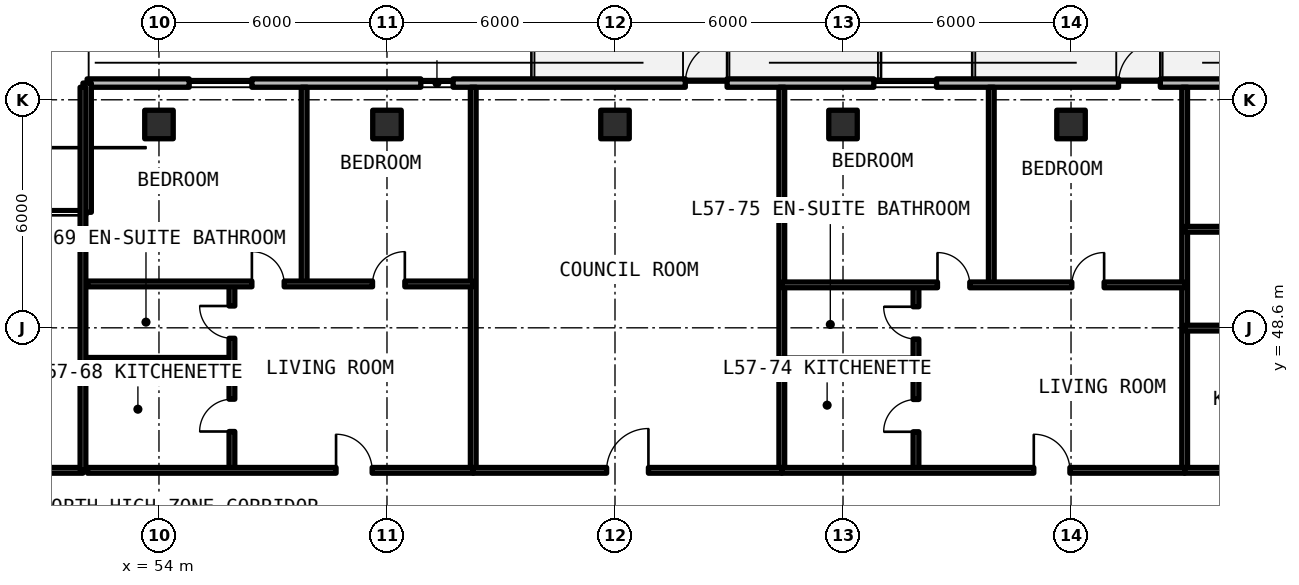
"""IFC4 building model, lengths in metres.
Left out: names, types, materials, properties, quantities, classifications, styles, units other than length and angle.
Written with IfcOpenShell. Run it as: python <this file> out.ifc"""

import sys

from ifc_helpers import new_model, si_unit, direction, frame, frame_2d, origin, origin_2d, place, context, subcontext, project, spatial, rectangle, extrude, element, fill, save


model = new_model("IFC4")
c1 = context("Model", 3, precision=1e-05, world=origin(), true_north=direction((0.0, 1.0)))
c2 = subcontext(c1, "Body", "Model", "MODEL_VIEW")
j1 = project(units=[si_unit("LENGTHUNIT", "METRE"), si_unit("PLANEANGLEUNIT", "RADIAN")], contexts=[c1])
p1 = place(None, origin())
s1 = spatial("IfcSite", under=j1, at=p1, CompositionType="ELEMENT")
p2 = place(p1, origin())
s2 = spatial("IfcBuilding", under=s1, at=p2, CompositionType="ELEMENT")
p3 = place(p2, frame((0.0, 0.0, 204.93)))
s3 = spatial("IfcBuildingStorey", under=s2, at=p3, CompositionType="ELEMENT", Elevation=204.93)
for number, where, z_axis, x_axis in (
    (1, (54.0, 53.95, 0.0), (0.0, 0.0, 1.0), (1.0, 0.0, 0.0)),
    (2, (60.0, 53.95, 0.0), (0.0, 0.0, 1.0), (1.0, 0.0, 0.0)),
    (3, (66.0, 53.95, 0.0), (0.0, 0.0, 1.0), (1.0, 0.0, 0.0)),
    (4, (72.0, 53.95, 0.0), (0.0, 0.0, 1.0), (1.0, 0.0, 0.0)),
    (5, (78.0, 53.95, 0.0), (0.0, 0.0, 1.0), (1.0, 0.0, 0.0)),
):
    element("IfcColumn", number, at=place(p3, frame(where, z_axis=z_axis, x_axis=x_axis)), inside=s3, PredefinedType="COLUMN", context=c2, shape_type="SweptSolid", body=[
        extrude(rectangle(XDim=0.75, YDim=0.75, at=origin_2d()), origin(), (0.0, 0.0, 1.0), 3.3),
    ])
p4 = place(p3, frame((95.354, 55.04, 0.0), z_axis=(0.0, 0.0, 1.0), x_axis=(-1.0, 0.0, 0.0)))
e6 = element("IfcWall", 6, at=p4, inside=s3, PredefinedType="SOLIDWALL", context=c2, shape_type="SweptSolid", body=[
    extrude(rectangle(XDim=43.244, YDim=0.22, at=frame_2d((21.622, 0.0))), origin(), (0.0, 0.0, 1.0), 3.08),
])
p5 = place(p4, frame((26.404, 0.0, 0.0)))
e7 = element("IfcOpeningElement", 7, at=p5, cuts=e6, PredefinedType="OPENING", context=c2, shape_type="SweptSolid", body=[
    extrude(rectangle(XDim=1.1, YDim=2.15, at=frame_2d((0.55, 1.075))), frame((0.0, 0.12, 0.0), z_axis=(0.0, -1.0, 0.0), x_axis=(1.0, 0.0, 0.0)), (0.0, 0.0, 1.0), 0.24),
])
p6 = place(p4, frame((15.004, 0.0, 0.0)))
e8 = element("IfcOpeningElement", 8, at=p6, cuts=e6, PredefinedType="OPENING", context=c2, shape_type="SweptSolid", body=[
    extrude(rectangle(XDim=1.1, YDim=2.15, at=frame_2d((0.55, 1.075))), frame((0.0, 0.12, 0.0), z_axis=(0.0, -1.0, 0.0), x_axis=(1.0, 0.0, 0.0)), (0.0, 0.0, 1.0), 0.24),
])
p7 = place(p4, frame((38.909, 0.0, 0.78)))
e9 = element("IfcOpeningElement", 9, at=p7, cuts=e6, PredefinedType="OPENING", context=c2, shape_type="SweptSolid", body=[
    extrude(rectangle(XDim=1.65, YDim=1.66, at=frame_2d((0.825, 0.83))), frame((0.0, 0.12, 0.0), z_axis=(0.0, -1.0, 0.0), x_axis=(1.0, 0.0, 0.0)), (0.0, 0.0, 1.0), 0.24),
])
p8 = place(p4, frame((33.615, 0.0, 0.78)))
e10 = element("IfcOpeningElement", 10, at=p8, cuts=e6, PredefinedType="OPENING", context=c2, shape_type="SweptSolid", body=[
    extrude(rectangle(XDim=0.85, YDim=1.65, at=frame_2d((0.425, 0.825))), frame((0.0, 0.12, 0.0), z_axis=(0.0, -1.0, 0.0), x_axis=(1.0, 0.0, 0.0)), (0.0, 0.0, 1.0), 0.24),
])
p9 = place(p4, frame((20.894, 0.0, 0.78)))
e11 = element("IfcOpeningElement", 11, at=p9, cuts=e6, PredefinedType="OPENING", context=c2, shape_type="SweptSolid", body=[
    extrude(rectangle(XDim=1.65, YDim=1.66, at=frame_2d((0.825, 0.83))), frame((0.0, 0.12, 0.0), z_axis=(0.0, -1.0, 0.0), x_axis=(1.0, 0.0, 0.0)), (0.0, 0.0, 1.0), 0.24),
])
p10 = place(p4, frame((8.792, 0.0, 0.78)))
e12 = element("IfcOpeningElement", 12, at=p10, cuts=e6, PredefinedType="OPENING", context=c2, shape_type="SweptSolid", body=[
    extrude(rectangle(XDim=1.65, YDim=1.66, at=frame_2d((0.825, 0.83))), frame((0.0, 0.12, 0.0), z_axis=(0.0, -1.0, 0.0), x_axis=(1.0, 0.0, 0.0)), (0.0, 0.0, 1.0), 0.24),
])
p11 = place(p4, frame((2.487, 0.0, 0.78)))
e13 = element("IfcOpeningElement", 13, at=p11, cuts=e6, PredefinedType="OPENING", context=c2, shape_type="SweptSolid", body=[
    extrude(rectangle(XDim=1.65, YDim=1.66, at=frame_2d((0.825, 0.83))), frame((0.0, 0.12, 0.0), z_axis=(0.0, -1.0, 0.0), x_axis=(1.0, 0.0, 0.0)), (0.0, 0.0, 1.0), 0.24),
])
p12 = place(p3, frame((52.11, 55.04, 0.0), z_axis=(0.0, 0.0, 1.0), x_axis=(0.0, -1.0, 0.0)))
e14 = element("IfcWall", 14, at=p12, inside=s3, PredefinedType="SOLIDWALL", context=c2, shape_type="SweptSolid", body=[
    extrude(rectangle(XDim=3.4, YDim=0.22, at=frame_2d((1.7, 0.0))), origin(), (0.0, 0.0, 1.0), 3.08),
])
p13 = place(p3, frame((43.6, 44.85, 0.0), z_axis=(0.0, 0.0, 1.0), x_axis=(1.0, 0.0, 0.0)))
e15 = element("IfcWall", 15, at=p13, inside=s3, PredefinedType="SOLIDWALL", context=c2, shape_type="SweptSolid", body=[
    extrude(rectangle(XDim=8.4, YDim=0.15, at=frame_2d((4.2, 0.0))), origin(), (0.0, 0.0, 1.0), 2.35),
])
p14 = place(p13, frame((3.65, 0.0, 0.0)))
e16 = element("IfcOpeningElement", 16, at=p14, cuts=e15, PredefinedType="OPENING", context=c2, shape_type="SweptSolid", body=[
    extrude(rectangle(XDim=1.1, YDim=2.15, at=frame_2d((0.55, 1.075))), frame((0.0, 0.085, 0.0), z_axis=(0.0, -1.0, 0.0), x_axis=(1.0, 0.0, 0.0)), (0.0, 0.0, 1.0), 0.17),
])
for number, where, z_axis, x_axis in (
    (17, (52.0, 44.85, 0.0), (0.0, 0.0, 1.0), (0.0, 1.0, 0.0)),
    (18, (62.27, 44.85, 0.0), (0.0, 0.0, 1.0), (0.0, 1.0, 0.0)),
):
    element("IfcWall", number, at=place(p3, frame(where, z_axis=z_axis, x_axis=x_axis)), inside=s3, PredefinedType="SOLIDWALL", context=c2, shape_type="SweptSolid", body=[
        extrude(rectangle(XDim=10.08, YDim=0.15, at=frame_2d((5.04, 0.0))), origin(), (0.0, 0.0, 1.0), 2.35),
    ])
p15 = place(p3, frame((52.12, 47.744, 0.0), z_axis=(0.0, 0.0, 1.0), x_axis=(1.0, 0.0, 0.0)))
e19 = element("IfcWall", 19, at=p15, inside=s3, PredefinedType="PARTITIONING", context=c2, shape_type="SweptSolid", body=[
    extrude(rectangle(XDim=3.8, YDim=0.15, at=frame_2d((1.9, 0.0))), origin(), (0.0, 0.0, 1.0), 2.35),
])
p16 = place(p3, frame((55.92, 44.85, 0.0), z_axis=(0.0, 0.0, 1.0), x_axis=(0.0, 1.0, 0.0)))
e20 = element("IfcWall", 20, at=p16, inside=s3, PredefinedType="PARTITIONING", context=c2, shape_type="SweptSolid", body=[
    extrude(rectangle(XDim=4.905, YDim=0.15, at=frame_2d((2.452, 0.0))), origin(), (0.0, 0.0, 1.0), 2.35),
])
p17 = place(p16, frame((1.022, 0.0, 0.0)))
e21 = element("IfcOpeningElement", 21, at=p17, cuts=e20, PredefinedType="OPENING", context=c2, shape_type="SweptSolid", body=[
    extrude(rectangle(XDim=0.85, YDim=2.1, at=frame_2d((0.425, 1.05))), frame((0.0, 0.085, 0.0), z_axis=(0.0, -1.0, 0.0), x_axis=(1.0, 0.0, 0.0)), (0.0, 0.0, 1.0), 0.17),
])
p18 = place(p16, frame((3.474, 0.0, 0.0)))
e22 = element("IfcOpeningElement", 22, at=p18, cuts=e20, PredefinedType="OPENING", context=c2, shape_type="SweptSolid", body=[
    extrude(rectangle(XDim=0.85, YDim=2.1, at=frame_2d((0.425, 1.05))), frame((0.0, 0.085, 0.0), z_axis=(0.0, -1.0, 0.0), x_axis=(1.0, 0.0, 0.0)), (0.0, 0.0, 1.0), 0.17),
])
p19 = place(p3, frame((57.82, 49.755, 0.0), z_axis=(0.0, 0.0, 1.0), x_axis=(0.0, 1.0, 0.0)))
e23 = element("IfcWall", 23, at=p19, inside=s3, PredefinedType="PARTITIONING", context=c2, shape_type="SweptSolid", body=[
    extrude(rectangle(XDim=5.175, YDim=0.15, at=frame_2d((2.588, 0.0))), origin(), (0.0, 0.0, 1.0), 2.35),
])
p20 = place(p3, frame((52.12, 49.755, 0.0), z_axis=(0.0, 0.0, 1.0), x_axis=(1.0, 0.0, 0.0)))
e24 = element("IfcWall", 24, at=p20, inside=s3, PredefinedType="PARTITIONING", context=c2, shape_type="SweptSolid", body=[
    extrude(rectangle(XDim=10.15, YDim=0.15, at=frame_2d((5.075, 0.0))), origin(), (0.0, 0.0, 1.0), 2.35),
])
p21 = place(p20, frame((4.325, 0.0, 0.0)))
e25 = element("IfcOpeningElement", 25, at=p21, cuts=e24, PredefinedType="OPENING", context=c2, shape_type="SweptSolid", body=[
    extrude(rectangle(XDim=0.85, YDim=2.1, at=frame_2d((0.425, 1.05))), frame((0.0, 0.085, 0.0), z_axis=(0.0, -1.0, 0.0), x_axis=(1.0, 0.0, 0.0)), (0.0, 0.0, 1.0), 0.17),
])
p22 = place(p20, frame((7.5, 0.0, 0.0)))
e26 = element("IfcOpeningElement", 26, at=p22, cuts=e24, PredefinedType="OPENING", context=c2, shape_type="SweptSolid", body=[
    extrude(rectangle(XDim=0.85, YDim=2.1, at=frame_2d((0.425, 1.05))), frame((0.0, 0.085, 0.0), z_axis=(0.0, -1.0, 0.0), x_axis=(1.0, 0.0, 0.0)), (0.0, 0.0, 1.0), 0.17),
])
p23 = place(p3, frame((52.12, 44.85, 0.0), z_axis=(0.0, 0.0, 1.0), x_axis=(1.0, 0.0, 0.0)))
e27 = element("IfcWall", 27, at=p23, inside=s3, PredefinedType="SOLIDWALL", context=c2, shape_type="SweptSolid", body=[
    extrude(rectangle(XDim=10.15, YDim=0.15, at=frame_2d((5.075, 0.0))), origin(), (0.0, 0.0, 1.0), 2.35),
])
p24 = place(p23, frame((6.54, 0.0, 0.0)))
e28 = element("IfcOpeningElement", 28, at=p24, cuts=e27, PredefinedType="OPENING", context=c2, shape_type="SweptSolid", body=[
    extrude(rectangle(XDim=0.95, YDim=2.15, at=frame_2d((0.475, 1.075))), frame((0.0, 0.085, 0.0), z_axis=(0.0, -1.0, 0.0), x_axis=(1.0, 0.0, 0.0)), (0.0, 0.0, 1.0), 0.17),
])
p25 = place(p3, frame((70.389, 44.85, 0.0), z_axis=(0.0, 0.0, 1.0), x_axis=(0.0, 1.0, 0.0)))
e29 = element("IfcWall", 29, at=p25, inside=s3, PredefinedType="SOLIDWALL", context=c2, shape_type="SweptSolid", body=[
    extrude(rectangle(XDim=10.08, YDim=0.15, at=frame_2d((5.04, 0.0))), origin(), (0.0, 0.0, 1.0), 2.35),
])
p26 = place(p3, frame((62.27, 44.85, 0.0), z_axis=(0.0, 0.0, 1.0), x_axis=(1.0, 0.0, 0.0)))
e30 = element("IfcWall", 30, at=p26, inside=s3, PredefinedType="SOLIDWALL", context=c2, shape_type="SweptSolid", body=[
    extrude(rectangle(XDim=8.12, YDim=0.15, at=frame_2d((4.06, 0.0))), origin(), (0.0, 0.0, 1.0), 2.35),
])
p27 = place(p26, frame((3.51, 0.0, 0.0)))
e31 = element("IfcOpeningElement", 31, at=p27, cuts=e30, PredefinedType="OPENING", context=c2, shape_type="SweptSolid", body=[
    extrude(rectangle(XDim=1.1, YDim=2.15, at=frame_2d((0.55, 1.075))), frame((0.0, 0.085, 0.0), z_axis=(0.0, -1.0, 0.0), x_axis=(1.0, 0.0, 0.0)), (0.0, 0.0, 1.0), 0.17),
])
p28 = place(p3, frame((80.99, 44.85, 0.0), z_axis=(0.0, 0.0, 1.0), x_axis=(0.0, 1.0, 0.0)))
e32 = element("IfcWall", 32, at=p28, inside=s3, PredefinedType="SOLIDWALL", context=c2, shape_type="SweptSolid", body=[
    extrude(rectangle(XDim=10.08, YDim=0.15, at=frame_2d((5.04, 0.0))), origin(), (0.0, 0.0, 1.0), 2.35),
])
p29 = place(p3, frame((70.389, 47.729, 0.0), z_axis=(0.0, 0.0, 1.0), x_axis=(1.0, 0.0, 0.0)))
e33 = element("IfcWall", 33, at=p29, inside=s3, PredefinedType="PARTITIONING", context=c2, shape_type="SweptSolid", body=[
    extrude(rectangle(XDim=3.531, YDim=0.15, at=frame_2d((1.765, 0.0))), origin(), (0.0, 0.0, 1.0), 2.35),
])
p30 = place(p3, frame((73.92, 44.85, 0.0), z_axis=(0.0, 0.0, 1.0), x_axis=(0.0, 1.0, 0.0)))
e34 = element("IfcWall", 34, at=p30, inside=s3, PredefinedType="PARTITIONING", context=c2, shape_type="SweptSolid", body=[
    extrude(rectangle(XDim=4.88, YDim=0.15, at=frame_2d((2.44, 0.0))), origin(), (0.0, 0.0, 1.0), 2.35),
])
p31 = place(p30, frame((1.015, 0.0, 0.0)))
e35 = element("IfcOpeningElement", 35, at=p31, cuts=e34, PredefinedType="OPENING", context=c2, shape_type="SweptSolid", body=[
    extrude(rectangle(XDim=0.85, YDim=2.1, at=frame_2d((0.425, 1.05))), frame((0.0, 0.085, 0.0), z_axis=(0.0, -1.0, 0.0), x_axis=(1.0, 0.0, 0.0)), (0.0, 0.0, 1.0), 0.17),
])
p32 = place(p30, frame((3.455, 0.0, 0.0)))
e36 = element("IfcOpeningElement", 36, at=p32, cuts=e34, PredefinedType="OPENING", context=c2, shape_type="SweptSolid", body=[
    extrude(rectangle(XDim=0.85, YDim=2.1, at=frame_2d((0.425, 1.05))), frame((0.0, 0.085, 0.0), z_axis=(0.0, -1.0, 0.0), x_axis=(1.0, 0.0, 0.0)), (0.0, 0.0, 1.0), 0.17),
])
p33 = place(p3, frame((75.902, 49.73, 0.0), z_axis=(0.0, 0.0, 1.0), x_axis=(0.0, 1.0, 0.0)))
e37 = element("IfcWall", 37, at=p33, inside=s3, PredefinedType="PARTITIONING", context=c2, shape_type="SweptSolid", body=[
    extrude(rectangle(XDim=5.2, YDim=0.15, at=frame_2d((2.6, 0.0))), origin(), (0.0, 0.0, 1.0), 2.35),
])
p34 = place(p3, frame((70.389, 49.73, 0.0), z_axis=(0.0, 0.0, 1.0), x_axis=(1.0, 0.0, 0.0)))
e38 = element("IfcWall", 38, at=p34, inside=s3, PredefinedType="PARTITIONING", context=c2, shape_type="SweptSolid", body=[
    extrude(rectangle(XDim=10.601, YDim=0.15, at=frame_2d((5.3, 0.0))), origin(), (0.0, 0.0, 1.0), 2.35),
])
p35 = place(p34, frame((4.096, 0.0, 0.0)))
e39 = element("IfcOpeningElement", 39, at=p35, cuts=e38, PredefinedType="OPENING", context=c2, shape_type="SweptSolid", body=[
    extrude(rectangle(XDim=0.85, YDim=2.1, at=frame_2d((0.425, 1.05))), frame((0.0, 0.085, 0.0), z_axis=(0.0, -1.0, 0.0), x_axis=(1.0, 0.0, 0.0)), (0.0, 0.0, 1.0), 0.17),
])
p36 = place(p34, frame((7.632, 0.0, 0.0)))
e40 = element("IfcOpeningElement", 40, at=p36, cuts=e38, PredefinedType="OPENING", context=c2, shape_type="SweptSolid", body=[
    extrude(rectangle(XDim=0.85, YDim=2.1, at=frame_2d((0.425, 1.05))), frame((0.0, 0.085, 0.0), z_axis=(0.0, -1.0, 0.0), x_axis=(1.0, 0.0, 0.0)), (0.0, 0.0, 1.0), 0.17),
])
p37 = place(p3, frame((70.389, 44.85, 0.0), z_axis=(0.0, 0.0, 1.0), x_axis=(1.0, 0.0, 0.0)))
e41 = element("IfcWall", 41, at=p37, inside=s3, PredefinedType="SOLIDWALL", context=c2, shape_type="SweptSolid", body=[
    extrude(rectangle(XDim=10.601, YDim=0.15, at=frame_2d((5.3, 0.0))), origin(), (0.0, 0.0, 1.0), 2.35),
])
p38 = place(p37, frame((6.631, 0.0, 0.0)))
e42 = element("IfcOpeningElement", 42, at=p38, cuts=e41, PredefinedType="OPENING", context=c2, shape_type="SweptSolid", body=[
    extrude(rectangle(XDim=0.95, YDim=2.15, at=frame_2d((0.475, 1.075))), frame((0.0, 0.085, 0.0), z_axis=(0.0, -1.0, 0.0), x_axis=(1.0, 0.0, 0.0)), (0.0, 0.0, 1.0), 0.17),
])
p39 = place(p3, frame((80.99, 48.592, 0.0), z_axis=(0.0, 0.0, 1.0), x_axis=(1.0, 0.0, 0.0)))
e43 = element("IfcWall", 43, at=p39, inside=s3, PredefinedType="PARTITIONING", context=c2, shape_type="SweptSolid", body=[
    extrude(rectangle(XDim=4.93, YDim=0.15, at=frame_2d((2.465, 0.0))), origin(), (0.0, 0.0, 1.0), 2.35),
])
p40 = place(p3, frame((80.99, 51.193, 0.0), z_axis=(0.0, 0.0, 1.0), x_axis=(1.0, 0.0, 0.0)))
e44 = element("IfcWall", 44, at=p40, inside=s3, PredefinedType="PARTITIONING", context=c2, shape_type="SweptSolid", body=[
    extrude(rectangle(XDim=7.894, YDim=0.15, at=frame_2d((3.947, 0.0))), origin(), (0.0, 0.0, 1.0), 2.35),
])
p41 = place(p40, frame((6.027, 0.0, 0.0)))
e45 = element("IfcOpeningElement", 45, at=p41, cuts=e44, PredefinedType="OPENING", context=c2, shape_type="SweptSolid", body=[
    extrude(rectangle(XDim=0.85, YDim=2.1, at=frame_2d((0.425, 1.05))), frame((0.0, 0.085, 0.0), z_axis=(0.0, -1.0, 0.0), x_axis=(1.0, 0.0, 0.0)), (0.0, 0.0, 1.0), 0.17),
])
p42 = place(p3, frame((80.99, 44.85, 0.0), z_axis=(0.0, 0.0, 1.0), x_axis=(1.0, 0.0, 0.0)))
e46 = element("IfcWall", 46, at=p42, inside=s3, PredefinedType="SOLIDWALL", context=c2, shape_type="SweptSolid", body=[
    extrude(rectangle(XDim=7.894, YDim=0.15, at=frame_2d((3.947, 0.0))), origin(), (0.0, 0.0, 1.0), 2.35),
])
p43 = place(p42, frame((5.977, 0.0, 0.0)))
e47 = element("IfcOpeningElement", 47, at=p43, cuts=e46, PredefinedType="OPENING", context=c2, shape_type="SweptSolid", body=[
    extrude(rectangle(XDim=0.95, YDim=2.15, at=frame_2d((0.475, 1.075))), frame((0.0, 0.085, 0.0), z_axis=(0.0, -1.0, 0.0), x_axis=(1.0, 0.0, 0.0)), (0.0, 0.0, 1.0), 0.17),
])
p44 = place(p5, frame((1.1, 0.0, 0.0), z_axis=(0.0, 0.0, 1.0), x_axis=(-1.0, 0.0, 0.0)))
e48 = element("IfcDoor", 48, at=p44, inside=s3, OperationType="SINGLE_SWING_RIGHT", PredefinedType="DOOR", context=c2, shape_type="SweptSolid", body=[
    extrude(rectangle(XDim=1.1, YDim=2.15, at=frame_2d((0.55, 1.075))), frame((0.0, 0.025, 0.0), z_axis=(0.0, -1.0, 0.0), x_axis=(1.0, 0.0, 0.0)), (0.0, 0.0, 1.0), 0.05),
])
fill(e7, e48)
p45 = place(p6, frame((1.1, 0.0, 0.0), z_axis=(0.0, 0.0, 1.0), x_axis=(-1.0, 0.0, 0.0)))
e49 = element("IfcDoor", 49, at=p45, inside=s3, OperationType="SINGLE_SWING_LEFT", PredefinedType="DOOR", context=c2, shape_type="SweptSolid", body=[
    extrude(rectangle(XDim=1.1, YDim=2.15, at=frame_2d((0.55, 1.075))), frame((0.0, 0.025, 0.0), z_axis=(0.0, -1.0, 0.0), x_axis=(1.0, 0.0, 0.0)), (0.0, 0.0, 1.0), 0.05),
])
fill(e8, e49)
p46 = place(p7, origin())
e50 = element("IfcWindow", 50, at=p46, inside=s3, PartitioningType="SINGLE_PANEL", PredefinedType="WINDOW", context=c2, shape_type="SweptSolid", body=[
    extrude(rectangle(XDim=1.65, YDim=1.66, at=frame_2d((0.825, 0.83))), frame((0.0, 0.03, 0.0), z_axis=(0.0, -1.0, 0.0), x_axis=(1.0, 0.0, 0.0)), (0.0, 0.0, 1.0), 0.06),
])
fill(e9, e50)
p47 = place(p8, origin())
e51 = element("IfcWindow", 51, at=p47, inside=s3, PartitioningType="SINGLE_PANEL", PredefinedType="WINDOW", context=c2, shape_type="SweptSolid", body=[
    extrude(rectangle(XDim=0.85, YDim=1.65, at=frame_2d((0.425, 0.825))), frame((0.0, 0.03, 0.0), z_axis=(0.0, -1.0, 0.0), x_axis=(1.0, 0.0, 0.0)), (0.0, 0.0, 1.0), 0.06),
])
fill(e10, e51)
p48 = place(p9, origin())
e52 = element("IfcWindow", 52, at=p48, inside=s3, PartitioningType="SINGLE_PANEL", PredefinedType="WINDOW", context=c2, shape_type="SweptSolid", body=[
    extrude(rectangle(XDim=1.65, YDim=1.66, at=frame_2d((0.825, 0.83))), frame((0.0, 0.03, 0.0), z_axis=(0.0, -1.0, 0.0), x_axis=(1.0, 0.0, 0.0)), (0.0, 0.0, 1.0), 0.06),
])
fill(e11, e52)
p49 = place(p17, origin())
e53 = element("IfcDoor", 53, at=p49, inside=s3, OperationType="SINGLE_SWING_LEFT", PredefinedType="DOOR", context=c2, shape_type="SweptSolid", body=[
    extrude(rectangle(XDim=0.85, YDim=2.1, at=frame_2d((0.425, 1.05))), frame((0.0, 0.025, 0.0), z_axis=(0.0, -1.0, 0.0), x_axis=(1.0, 0.0, 0.0)), (0.0, 0.0, 1.0), 0.05),
])
fill(e21, e53)
p50 = place(p18, origin())
e54 = element("IfcDoor", 54, at=p50, inside=s3, OperationType="SINGLE_SWING_RIGHT", PredefinedType="DOOR", context=c2, shape_type="SweptSolid", body=[
    extrude(rectangle(XDim=0.85, YDim=2.1, at=frame_2d((0.425, 1.05))), frame((0.0, 0.025, 0.0), z_axis=(0.0, -1.0, 0.0), x_axis=(1.0, 0.0, 0.0)), (0.0, 0.0, 1.0), 0.05),
])
fill(e22, e54)
p51 = place(p21, origin())
e55 = element("IfcDoor", 55, at=p51, inside=s3, OperationType="SINGLE_SWING_LEFT", PredefinedType="DOOR", context=c2, shape_type="SweptSolid", body=[
    extrude(rectangle(XDim=0.85, YDim=2.1, at=frame_2d((0.425, 1.05))), frame((0.0, 0.025, 0.0), z_axis=(0.0, -1.0, 0.0), x_axis=(1.0, 0.0, 0.0)), (0.0, 0.0, 1.0), 0.05),
])
fill(e25, e55)
p52 = place(p22, origin())
e56 = element("IfcDoor", 56, at=p52, inside=s3, OperationType="SINGLE_SWING_RIGHT", PredefinedType="DOOR", context=c2, shape_type="SweptSolid", body=[
    extrude(rectangle(XDim=0.85, YDim=2.1, at=frame_2d((0.425, 1.05))), frame((0.0, 0.025, 0.0), z_axis=(0.0, -1.0, 0.0), x_axis=(1.0, 0.0, 0.0)), (0.0, 0.0, 1.0), 0.05),
])
fill(e26, e56)
p53 = place(p24, origin())
e57 = element("IfcDoor", 57, at=p53, inside=s3, OperationType="SINGLE_SWING_LEFT", PredefinedType="DOOR", context=c2, shape_type="SweptSolid", body=[
    extrude(rectangle(XDim=0.95, YDim=2.15, at=frame_2d((0.475, 1.075))), frame((0.0, 0.025, 0.0), z_axis=(0.0, -1.0, 0.0), x_axis=(1.0, 0.0, 0.0)), (0.0, 0.0, 1.0), 0.05),
])
fill(e28, e57)
p54 = place(p27, origin())
e58 = element("IfcDoor", 58, at=p54, inside=s3, OperationType="SINGLE_SWING_RIGHT", PredefinedType="DOOR", context=c2, shape_type="SweptSolid", body=[
    extrude(rectangle(XDim=1.1, YDim=2.15, at=frame_2d((0.55, 1.075))), frame((0.0, 0.025, 0.0), z_axis=(0.0, -1.0, 0.0), x_axis=(1.0, 0.0, 0.0)), (0.0, 0.0, 1.0), 0.05),
])
fill(e31, e58)
p55 = place(p31, origin())
e59 = element("IfcDoor", 59, at=p55, inside=s3, OperationType="SINGLE_SWING_LEFT", PredefinedType="DOOR", context=c2, shape_type="SweptSolid", body=[
    extrude(rectangle(XDim=0.85, YDim=2.1, at=frame_2d((0.425, 1.05))), frame((0.0, 0.025, 0.0), z_axis=(0.0, -1.0, 0.0), x_axis=(1.0, 0.0, 0.0)), (0.0, 0.0, 1.0), 0.05),
])
fill(e35, e59)
p56 = place(p32, origin())
e60 = element("IfcDoor", 60, at=p56, inside=s3, OperationType="SINGLE_SWING_RIGHT", PredefinedType="DOOR", context=c2, shape_type="SweptSolid", body=[
    extrude(rectangle(XDim=0.85, YDim=2.1, at=frame_2d((0.425, 1.05))), frame((0.0, 0.025, 0.0), z_axis=(0.0, -1.0, 0.0), x_axis=(1.0, 0.0, 0.0)), (0.0, 0.0, 1.0), 0.05),
])
fill(e36, e60)
p57 = place(p35, origin())
e61 = element("IfcDoor", 61, at=p57, inside=s3, OperationType="SINGLE_SWING_LEFT", PredefinedType="DOOR", context=c2, shape_type="SweptSolid", body=[
    extrude(rectangle(XDim=0.85, YDim=2.1, at=frame_2d((0.425, 1.05))), frame((0.0, 0.025, 0.0), z_axis=(0.0, -1.0, 0.0), x_axis=(1.0, 0.0, 0.0)), (0.0, 0.0, 1.0), 0.05),
])
fill(e39, e61)
p58 = place(p36, origin())
e62 = element("IfcDoor", 62, at=p58, inside=s3, OperationType="SINGLE_SWING_RIGHT", PredefinedType="DOOR", context=c2, shape_type="SweptSolid", body=[
    extrude(rectangle(XDim=0.85, YDim=2.1, at=frame_2d((0.425, 1.05))), frame((0.0, 0.025, 0.0), z_axis=(0.0, -1.0, 0.0), x_axis=(1.0, 0.0, 0.0)), (0.0, 0.0, 1.0), 0.05),
])
fill(e40, e62)
p59 = place(p38, origin())
e63 = element("IfcDoor", 63, at=p59, inside=s3, OperationType="SINGLE_SWING_LEFT", PredefinedType="DOOR", context=c2, shape_type="SweptSolid", body=[
    extrude(rectangle(XDim=0.95, YDim=2.15, at=frame_2d((0.475, 1.075))), frame((0.0, 0.025, 0.0), z_axis=(0.0, -1.0, 0.0), x_axis=(1.0, 0.0, 0.0)), (0.0, 0.0, 1.0), 0.05),
])
fill(e42, e63)
save(model, sys.argv[1])
